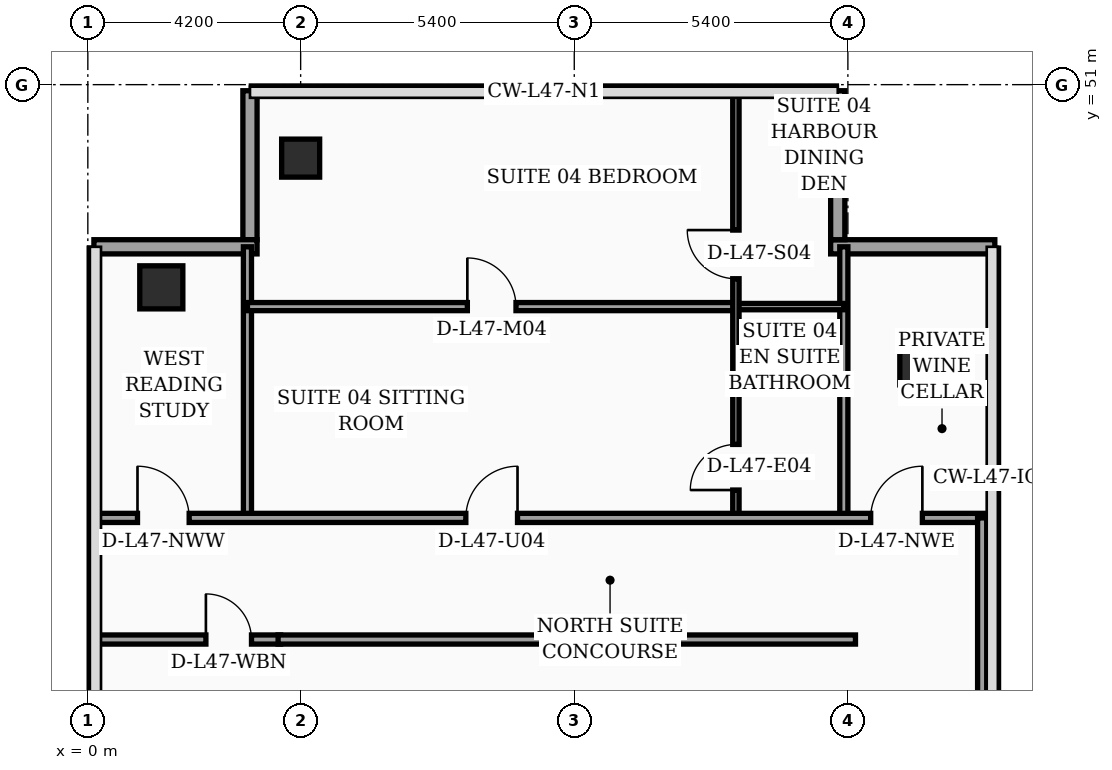
"""IFC4 building model, lengths in metres.
Left out: names, types, materials, properties, quantities, classifications, styles, units other than length and angle.
Written with IfcOpenShell. Run it as: python <this file> out.ifc"""

import sys

from ifc_helpers import new_model, si_unit, direction, frame, frame_2d, origin, origin_2d, place, context, subcontext, project, spatial, rectangle, hollow_rectangle, extrude, element, fill, save


model = new_model("IFC4")
c1 = context("Model", 3, precision=1e-05, world=origin(), true_north=direction((0.0, 1.0)))
c2 = subcontext(c1, "Body", "Model", "MODEL_VIEW")
j1 = project(units=[si_unit("LENGTHUNIT", "METRE"), si_unit("PLANEANGLEUNIT", "RADIAN")], contexts=[c1])
p1 = place(None, origin())
s1 = spatial("IfcSite", under=j1, at=p1, CompositionType="ELEMENT")
p2 = place(p1, origin())
s2 = spatial("IfcBuilding", under=s1, at=p2, CompositionType="ELEMENT")
p3 = place(p2, frame((0.0, 0.0, 191.3)))
s3 = spatial("IfcBuildingStorey", under=s2, at=p3, CompositionType="ELEMENT", Elevation=191.3)
p4 = place(p3, frame((1.45, 47.0, 0.0), z_axis=(0.0, 0.0, 1.0), x_axis=(1.0, 0.0, 0.0)))
e1 = element("IfcColumn", 1, at=p4, inside=s3, PredefinedType="COLUMN", context=c2, shape_type="SweptSolid", body=[
    extrude(hollow_rectangle(XDim=0.85, YDim=0.85, WallThickness=0.036, at=origin_2d()), origin(), (0.0, 0.0, 1.0), 3.56),
])
p5 = place(p3, frame((4.2, 49.55, 0.0), z_axis=(0.0, 0.0, 1.0), x_axis=(1.0, 0.0, 0.0)))
e2 = element("IfcColumn", 2, at=p5, inside=s3, PredefinedType="COLUMN", context=c2, shape_type="SweptSolid", body=[
    extrude(hollow_rectangle(XDim=0.75, YDim=0.75, WallThickness=0.032, at=origin_2d()), origin(), (0.0, 0.0, 1.0), 3.56),
])
p6 = place(p3, frame((16.55, 45.6, 0.0), z_axis=(0.0, 0.0, 1.0), x_axis=(1.0, 0.0, 0.0)))
e3 = element("IfcColumn", 3, at=p6, inside=s3, PredefinedType="COLUMN", context=c2, shape_type="SweptSolid", body=[
    extrude(rectangle(XDim=1.05, YDim=1.05, at=origin_2d()), origin(), (0.0, 0.0, 1.0), 3.56),
])
p7 = place(p3, frame((17.9, 47.8, 0.0), z_axis=(0.0, 0.0, 1.0), x_axis=(-1.0, 0.0, 0.0)))
e4 = element("IfcWall", 4, at=p7, inside=s3, PredefinedType="SOLIDWALL", context=c2, shape_type="SweptSolid", body=[
    extrude(rectangle(XDim=3.24, YDim=0.28, at=frame_2d((1.62, 0.0))), origin(), (0.0, 0.0, 1.0), 3.56),
])
p8 = place(p3, frame((14.8, 47.94, 0.0), z_axis=(0.0, 0.0, 1.0), x_axis=(0.0, 1.0, 0.0)))
e5 = element("IfcWall", 5, at=p8, inside=s3, PredefinedType="SOLIDWALL", context=c2, shape_type="SweptSolid", body=[
    extrude(rectangle(XDim=2.94, YDim=0.28, at=frame_2d((1.47, 0.0))), origin(), (0.0, 0.0, 1.0), 3.56),
])
p9 = place(p3, frame((3.2, 50.88, 0.0), z_axis=(0.0, 0.0, 1.0), x_axis=(0.0, -1.0, 0.0)))
e6 = element("IfcWall", 6, at=p9, inside=s3, PredefinedType="SOLIDWALL", context=c2, shape_type="SweptSolid", body=[
    extrude(rectangle(XDim=2.94, YDim=0.28, at=frame_2d((1.47, 0.0))), origin(), (0.0, 0.0, 1.0), 3.09),
])
p10 = place(p3, frame((3.34, 47.8, 0.0), z_axis=(0.0, 0.0, 1.0), x_axis=(-1.0, 0.0, 0.0)))
e7 = element("IfcWall", 7, at=p10, inside=s3, PredefinedType="SOLIDWALL", context=c2, shape_type="SweptSolid", body=[
    extrude(rectangle(XDim=3.22, YDim=0.28, at=frame_2d((1.61, 0.0))), origin(), (0.0, 0.0, 1.0), 3.09),
])
p11 = place(p3, frame((0.08, 40.05, 0.0), z_axis=(0.0, 0.0, 1.0), x_axis=(1.0, 0.0, 0.0)))
e8 = element("IfcWall", 8, at=p11, inside=s3, PredefinedType="PARTITIONING", context=c2, shape_type="SweptSolid", body=[
    extrude(rectangle(XDim=3.725, YDim=0.18, at=frame_2d((1.862, 0.0))), origin(), (0.0, 0.0, 1.0), 2.94),
])
p12 = place(p11, frame((2.25, 0.0, 0.0)))
e9 = element("IfcOpeningElement", 9, at=p12, cuts=e8, PredefinedType="OPENING", context=c2, shape_type="SweptSolid", body=[
    extrude(rectangle(XDim=0.9, YDim=2.15, at=frame_2d((0.45, 1.075))), frame((0.0, 0.1, 0.0), z_axis=(0.0, -1.0, 0.0), x_axis=(1.0, 0.0, 0.0)), (0.0, 0.0, 1.0), 0.2),
])
p13 = place(p3, frame((3.15, 42.45, 0.0), z_axis=(0.0, 0.0, 1.0), x_axis=(0.0, 1.0, 0.0)))
e10 = element("IfcWall", 10, at=p13, inside=s3, PredefinedType="PARTITIONING", context=c2, shape_type="SweptSolid", body=[
    extrude(rectangle(XDim=5.35, YDim=0.16, at=frame_2d((2.675, 0.0))), origin(), (0.0, 0.0, 1.0), 3.14),
])
p14 = place(p3, frame((14.92, 42.45, 0.0), z_axis=(0.0, 0.0, 1.0), x_axis=(0.0, 1.0, 0.0)))
e11 = element("IfcWall", 11, at=p14, inside=s3, PredefinedType="PARTITIONING", context=c2, shape_type="SweptSolid", body=[
    extrude(rectangle(XDim=5.35, YDim=0.16, at=frame_2d((2.675, 0.0))), origin(), (0.0, 0.0, 1.0), 3.09),
])
p15 = place(p3, frame((12.79, 46.62, 0.0), z_axis=(0.0, 0.0, 1.0), x_axis=(1.0, 0.0, 0.0)))
e12 = element("IfcWall", 12, at=p15, inside=s3, PredefinedType="PARTITIONING", context=c2, shape_type="SweptSolid", body=[
    extrude(rectangle(XDim=2.13, YDim=0.125, at=frame_2d((1.065, 0.0))), origin(), (0.0, 0.0, 1.0), 3.09),
])
p16 = place(p3, frame((3.15, 46.62, 0.0), z_axis=(0.0, 0.0, 1.0), x_axis=(1.0, 0.0, 0.0)))
e13 = element("IfcWall", 13, at=p16, inside=s3, PredefinedType="PARTITIONING", context=c2, shape_type="SweptSolid", body=[
    extrude(rectangle(XDim=9.64, YDim=0.16, at=frame_2d((4.82, 0.0))), origin(), (0.0, 0.0, 1.0), 2.94),
])
p17 = place(p16, frame((4.34, 0.0, 0.0)))
e14 = element("IfcOpeningElement", 14, at=p17, cuts=e13, PredefinedType="OPENING", context=c2, shape_type="SweptSolid", body=[
    extrude(rectangle(XDim=0.96, YDim=2.2, at=frame_2d((0.48, 1.1))), frame((0.0, 0.09, 0.0), z_axis=(0.0, -1.0, 0.0), x_axis=(1.0, 0.0, 0.0)), (0.0, 0.0, 1.0), 0.18),
])
p18 = place(p3, frame((12.79, 42.45, 0.0), z_axis=(0.0, 0.0, 1.0), x_axis=(0.0, 1.0, 0.0)))
e15 = element("IfcWall", 15, at=p18, inside=s3, PredefinedType="PARTITIONING", context=c2, shape_type="SweptSolid", body=[
    extrude(rectangle(XDim=8.49, YDim=0.125, at=frame_2d((4.245, 0.0))), origin(), (0.0, 0.0, 1.0), 3.09),
])
p19 = place(p18, frame((0.55, 0.0, 0.0)))
e16 = element("IfcOpeningElement", 16, at=p19, cuts=e15, PredefinedType="OPENING", context=c2, shape_type="SweptSolid", body=[
    extrude(rectangle(XDim=0.9, YDim=2.15, at=frame_2d((0.45, 1.075))), frame((0.0, 0.073, 0.0), z_axis=(0.0, -1.0, 0.0), x_axis=(1.0, 0.0, 0.0)), (0.0, 0.0, 1.0), 0.145),
])
p20 = place(p18, frame((4.72, 0.0, 0.0)))
e17 = element("IfcOpeningElement", 17, at=p20, cuts=e15, PredefinedType="OPENING", context=c2, shape_type="SweptSolid", body=[
    extrude(rectangle(XDim=0.96, YDim=2.2, at=frame_2d((0.48, 1.1))), frame((0.0, 0.073, 0.0), z_axis=(0.0, -1.0, 0.0), x_axis=(1.0, 0.0, 0.0)), (0.0, 0.0, 1.0), 0.145),
])
p21 = place(p3, frame((0.08, 42.45, 0.0), z_axis=(0.0, 0.0, 1.0), x_axis=(1.0, 0.0, 0.0)))
e18 = element("IfcWall", 18, at=p21, inside=s3, PredefinedType="PARTITIONING", context=c2, shape_type="SweptSolid", body=[
    extrude(rectangle(XDim=17.77, YDim=0.18, at=frame_2d((8.885, 0.0))), origin(), (0.0, 0.0, 1.0), 2.94),
])
p22 = place(p21, frame((0.9, 0.0, 0.0)))
e19 = element("IfcOpeningElement", 19, at=p22, cuts=e18, PredefinedType="OPENING", context=c2, shape_type="SweptSolid", body=[
    extrude(rectangle(XDim=1.02, YDim=2.2, at=frame_2d((0.51, 1.1))), frame((0.0, 0.1, 0.0), z_axis=(0.0, -1.0, 0.0), x_axis=(1.0, 0.0, 0.0)), (0.0, 0.0, 1.0), 0.2),
])
p23 = place(p21, frame((7.38, 0.0, 0.0)))
e20 = element("IfcOpeningElement", 20, at=p23, cuts=e18, PredefinedType="OPENING", context=c2, shape_type="SweptSolid", body=[
    extrude(rectangle(XDim=1.02, YDim=2.2, at=frame_2d((0.51, 1.1))), frame((0.0, 0.1, 0.0), z_axis=(0.0, -1.0, 0.0), x_axis=(1.0, 0.0, 0.0)), (0.0, 0.0, 1.0), 0.2),
])
p24 = place(p21, frame((15.37, 0.0, 0.0)))
e21 = element("IfcOpeningElement", 21, at=p24, cuts=e18, PredefinedType="OPENING", context=c2, shape_type="SweptSolid", body=[
    extrude(rectangle(XDim=1.02, YDim=2.2, at=frame_2d((0.51, 1.1))), frame((0.0, 0.1, 0.0), z_axis=(0.0, -1.0, 0.0), x_axis=(1.0, 0.0, 0.0)), (0.0, 0.0, 1.0), 0.2),
])
p25 = place(p3, frame((17.65, 24.3, 0.0), z_axis=(0.0, 0.0, 1.0), x_axis=(0.0, 1.0, 0.0)))
e22 = element("IfcWall", 22, at=p25, inside=s3, PredefinedType="PARTITIONING", context=c2, shape_type="SweptSolid", body=[
    extrude(rectangle(XDim=18.15, YDim=0.18, at=frame_2d((9.075, 0.0))), origin(), (0.0, 0.0, 1.0), 2.94),
])
p26 = place(p3, frame((3.755, 40.05, 0.0), z_axis=(0.0, 0.0, 1.0), x_axis=(1.0, 0.0, 0.0)))
e23 = element("IfcWall", 23, at=p26, inside=s3, PredefinedType="PARTITIONING", context=c2, shape_type="SweptSolid", body=[
    extrude(rectangle(XDim=11.395, YDim=0.18, at=frame_2d((5.698, 0.0))), origin(), (0.0, 0.0, 1.0), 2.94),
])
p27 = place(p12, origin())
e24 = element("IfcDoor", 24, at=p27, inside=s3, OperationType="SINGLE_SWING_LEFT", PredefinedType="DOOR", context=c2, shape_type="SweptSolid", body=[
    extrude(rectangle(XDim=0.9, YDim=2.15, at=frame_2d((0.45, 1.075))), frame((0.0, 0.025, 0.0), z_axis=(0.0, -1.0, 0.0), x_axis=(1.0, 0.0, 0.0)), (0.0, 0.0, 1.0), 0.05),
])
fill(e9, e24)
p28 = place(p17, origin())
e25 = element("IfcDoor", 25, at=p28, inside=s3, OperationType="SINGLE_SWING_LEFT", PredefinedType="DOOR", context=c2, shape_type="SweptSolid", body=[
    extrude(rectangle(XDim=0.96, YDim=2.2, at=frame_2d((0.48, 1.1))), frame((0.0, 0.025, 0.0), z_axis=(0.0, -1.0, 0.0), x_axis=(1.0, 0.0, 0.0)), (0.0, 0.0, 1.0), 0.05),
])
fill(e14, e25)
p29 = place(p19, origin())
e26 = element("IfcDoor", 26, at=p29, inside=s3, OperationType="SINGLE_SWING_LEFT", PredefinedType="DOOR", context=c2, shape_type="SweptSolid", body=[
    extrude(rectangle(XDim=0.9, YDim=2.15, at=frame_2d((0.45, 1.075))), frame((0.0, 0.025, 0.0), z_axis=(0.0, -1.0, 0.0), x_axis=(1.0, 0.0, 0.0)), (0.0, 0.0, 1.0), 0.05),
])
fill(e16, e26)
p30 = place(p20, origin())
e27 = element("IfcDoor", 27, at=p30, inside=s3, OperationType="SINGLE_SWING_RIGHT", PredefinedType="DOOR", context=c2, shape_type="SweptSolid", body=[
    extrude(rectangle(XDim=0.96, YDim=2.2, at=frame_2d((0.48, 1.1))), frame((0.0, 0.025, 0.0), z_axis=(0.0, -1.0, 0.0), x_axis=(1.0, 0.0, 0.0)), (0.0, 0.0, 1.0), 0.05),
])
fill(e17, e27)
p31 = place(p22, origin())
e28 = element("IfcDoor", 28, at=p31, inside=s3, OperationType="SINGLE_SWING_LEFT", PredefinedType="DOOR", context=c2, shape_type="SweptSolid", body=[
    extrude(rectangle(XDim=1.02, YDim=2.2, at=frame_2d((0.51, 1.1))), frame((0.0, 0.025, 0.0), z_axis=(0.0, -1.0, 0.0), x_axis=(1.0, 0.0, 0.0)), (0.0, 0.0, 1.0), 0.05),
])
fill(e19, e28)
p32 = place(p23, origin())
e29 = element("IfcDoor", 29, at=p32, inside=s3, OperationType="SINGLE_SWING_RIGHT", PredefinedType="DOOR", context=c2, shape_type="SweptSolid", body=[
    extrude(rectangle(XDim=1.02, YDim=2.2, at=frame_2d((0.51, 1.1))), frame((0.0, 0.025, 0.0), z_axis=(0.0, -1.0, 0.0), x_axis=(1.0, 0.0, 0.0)), (0.0, 0.0, 1.0), 0.05),
])
fill(e20, e29)
p33 = place(p24, origin())
e30 = element("IfcDoor", 30, at=p33, inside=s3, OperationType="SINGLE_SWING_RIGHT", PredefinedType="DOOR", context=c2, shape_type="SweptSolid", body=[
    extrude(rectangle(XDim=1.02, YDim=2.2, at=frame_2d((0.51, 1.1))), frame((0.0, 0.025, 0.0), z_axis=(0.0, -1.0, 0.0), x_axis=(1.0, 0.0, 0.0)), (0.0, 0.0, 1.0), 0.05),
])
fill(e21, e30)
save(model, sys.argv[1])
